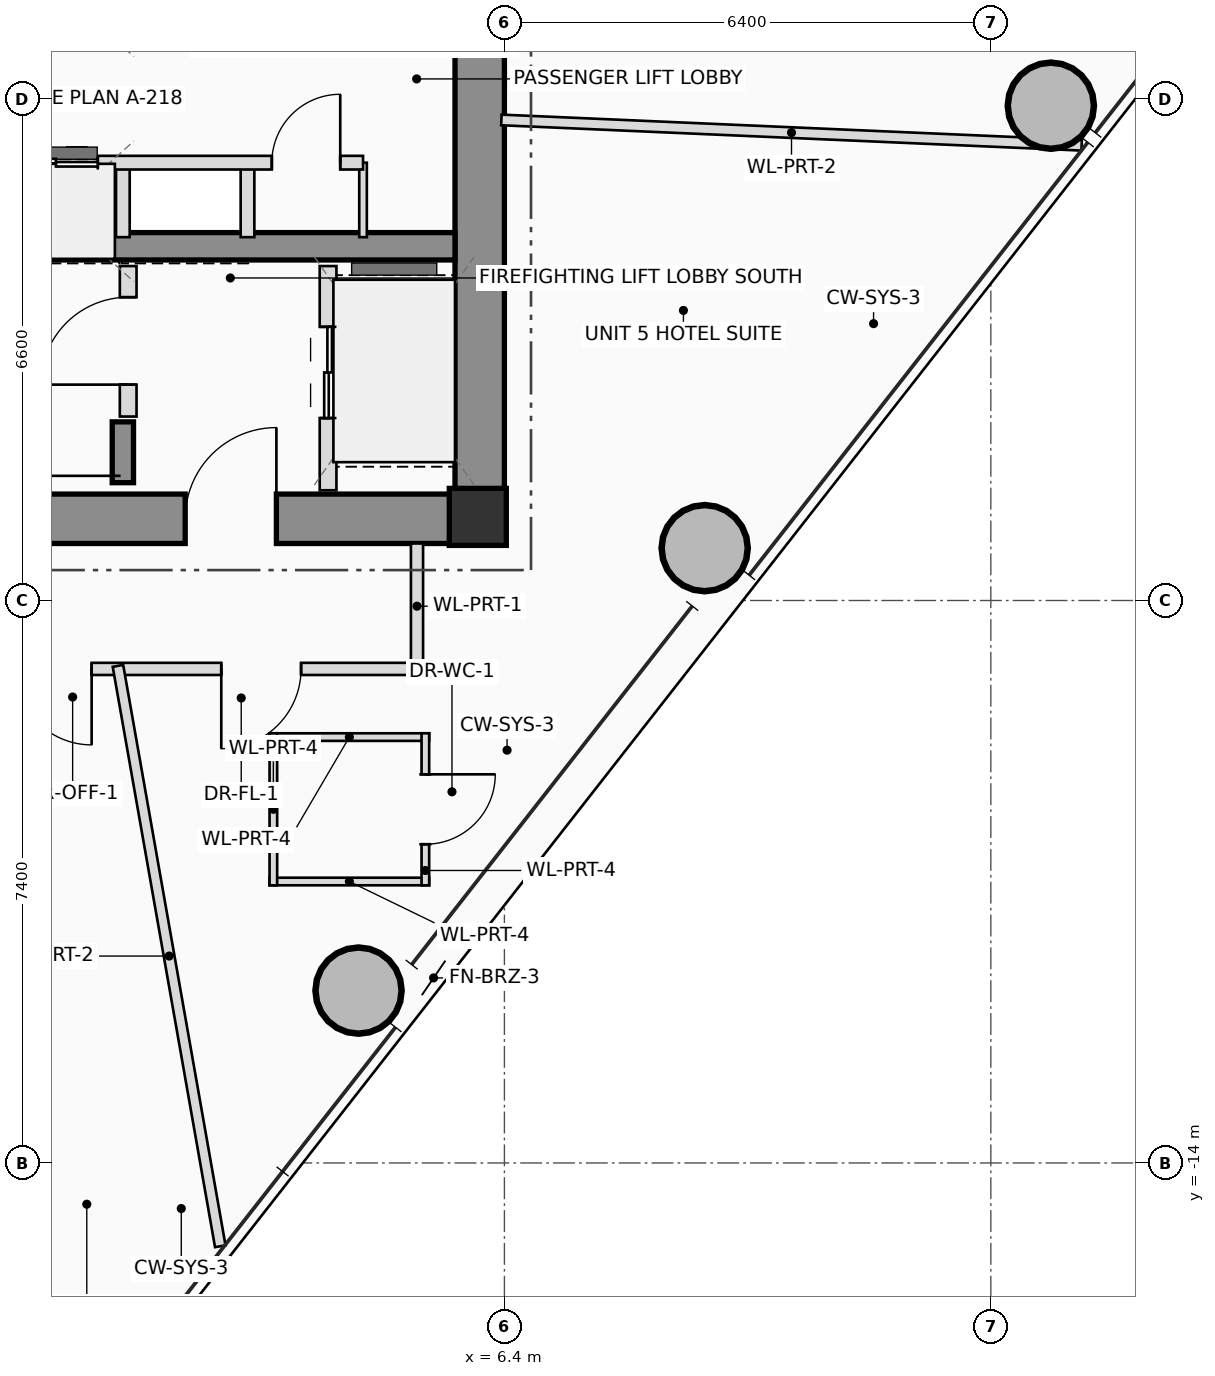
"""IFC4 building model, lengths in metres.
Left out: names, types, materials, properties, quantities, classifications, styles, units other than length and angle.
Written with IfcOpenShell. Run it as: python <this file> out.ifc"""

import sys

from ifc_helpers import new_model, si_unit, direction, frame, frame_2d, origin, origin_2d, place, context, subcontext, project, spatial, rectangle, hollow_circle, extrude, source, transform, mapped, element, fill, save


model = new_model("IFC4")
c1 = context("Model", 3, precision=1e-05, world=origin(), true_north=direction((0.0, 1.0)))
c2 = subcontext(c1, "Body", "Model", "MODEL_VIEW")
j1 = project(units=[si_unit("LENGTHUNIT", "METRE"), si_unit("PLANEANGLEUNIT", "RADIAN")], contexts=[c1])
p1 = place(None, origin())
s1 = spatial("IfcSite", under=j1, at=p1, CompositionType="ELEMENT")
p2 = place(p1, origin())
s2 = spatial("IfcBuilding", under=s1, at=p2, CompositionType="ELEMENT")
p3 = place(p2, frame((0.0, 0.0, 191.45)))
s3 = spatial("IfcBuildingStorey", under=s2, at=p3, CompositionType="ELEMENT", Elevation=191.45)
m1 = source(origin(), c2, "Body", "SweptSolid", [
    extrude(rectangle(XDim=0.75, YDim=0.75, at=origin_2d()), origin(), (0.0, 0.0, 1.0), 3.45),
])
p4 = place(p3, frame((6.05, -5.5, 0.0), z_axis=(0.0, 0.0, 1.0), x_axis=(1.0, 0.0, 0.0)))
e1 = element("IfcColumn", 1, at=p4, inside=s3, PredefinedType="COLUMN", context=c2, shape_type="MappedRepresentation", body=[
    mapped(m1, transform((0.0, 0.0, 0.0), scale=1.0)),
])
p5 = place(p3, frame((-6.4, -5.525, 0.0), z_axis=(0.0, 0.0, 1.0), x_axis=(1.0, 0.0, 0.0)))
e2 = element("IfcWall", 2, at=p5, inside=s3, PredefinedType="SHEAR", context=c2, shape_type="SweptSolid", body=[
    extrude(rectangle(XDim=12.8, YDim=0.65, at=frame_2d((6.4, 0.0))), origin(), (0.0, 0.0, 1.0), 3.45),
])
p6 = place(p5, frame((8.6, 0.0, 0.0)))
e3 = element("IfcOpeningElement", 3, at=p6, cuts=e2, PredefinedType="OPENING", context=c2, shape_type="SweptSolid", body=[
    extrude(rectangle(XDim=1.2, YDim=2.2, at=frame_2d((0.6, 1.1))), frame((0.0, 0.335, 0.0), z_axis=(0.0, -1.0, 0.0), x_axis=(1.0, 0.0, 0.0)), (0.0, 0.0, 1.0), 0.67),
])
p7 = place(p3, frame((6.075, -5.2, 0.0), z_axis=(0.0, 0.0, 1.0), x_axis=(0.0, 1.0, 0.0)))
e4 = element("IfcWall", 4, at=p7, inside=s3, PredefinedType="SHEAR", context=c2, shape_type="SweptSolid", body=[
    extrude(rectangle(XDim=10.4, YDim=0.65, at=frame_2d((5.2, 0.0))), origin(), (0.0, 0.0, 1.0), 3.45),
])
p8 = place(p3, frame((-5.75, -1.94, 0.0), z_axis=(0.0, 0.0, 1.0), x_axis=(1.0, 0.0, 0.0)))
e5 = element("IfcWall", 5, at=p8, inside=s3, PredefinedType="SHEAR", context=c2, shape_type="SweptSolid", body=[
    extrude(rectangle(XDim=11.5, YDim=0.36, at=frame_2d((5.75, 0.0))), origin(), (0.0, 0.0, 1.0), 3.45),
])
p9 = place(p3, frame((1.38, -5.05, 0.0), z_axis=(0.0, 0.0, 1.0), x_axis=(0.0, 1.0, 0.0)))
e6 = element("IfcWall", 6, at=p9, inside=s3, PredefinedType="SHEAR", context=c2, shape_type="SweptSolid", body=[
    extrude(rectangle(XDim=0.8, YDim=0.28, at=frame_2d((0.4, 0.0))), origin(), (0.0, 0.0, 1.0), 3.45),
])
m2 = source(origin(), c2, "Body", "SweptSolid", [
    extrude(hollow_circle(Radius=0.575, WallThickness=0.042, at=origin_2d()), origin(), (0.0, 0.0, 1.0), 3.45),
])
for number, where, z_axis, x_axis in (
    (7, (4.481, -11.732, 0.0), (0.0, 0.0, 1.0), (1.0, 0.0, 0.0)),
    (8, (9.035, -5.911, 0.0), (0.0, 0.0, 1.0), (1.0, 0.0, 0.0)),
    (9, (13.59, -0.09, 0.0), (0.0, 0.0, 1.0), (1.0, 0.0, 0.0)),
):
    element("IfcColumn", number, at=place(p3, frame(where, z_axis=z_axis, x_axis=x_axis)), inside=s3, PredefinedType="COLUMN", context=c2, shape_type="MappedRepresentation", body=[
        mapped(m2, transform((0.0, 0.0, 0.0), scale=1.0)),
    ])
p10 = place(p3, frame((1.45, -4.18, 0.0), z_axis=(0.0, 0.0, 1.0), x_axis=(0.0, 1.0, 0.0)))
e10 = element("IfcWall", 10, at=p10, inside=s3, PredefinedType="PLUMBINGWALL", context=c2, shape_type="SweptSolid", body=[
    extrude(rectangle(XDim=1.98, YDim=0.22, at=frame_2d((0.99, 0.0))), origin(), (0.0, 0.0, 1.0), 3.25),
])
p11 = place(p10, frame((0.42, 0.0, 0.0)))
e11 = element("IfcOpeningElement", 11, at=p11, cuts=e10, PredefinedType="OPENING", context=c2, shape_type="SweptSolid", body=[
    extrude(rectangle(XDim=1.15, YDim=2.15, at=frame_2d((0.575, 1.075))), frame((0.0, 0.12, 0.0), z_axis=(0.0, -1.0, 0.0), x_axis=(1.0, 0.0, 0.0)), (0.0, 0.0, 1.0), 0.24),
])
p12 = place(p3, frame((4.08, -5.15, 0.0), z_axis=(0.0, 0.0, 1.0), x_axis=(0.0, 1.0, 0.0)))
e12 = element("IfcWall", 12, at=p12, inside=s3, PredefinedType="PLUMBINGWALL", context=c2, shape_type="SweptSolid", body=[
    extrude(rectangle(XDim=2.95, YDim=0.22, at=frame_2d((1.475, 0.0))), origin(), (0.0, 0.0, 1.0), 3.25),
])
p13 = place(p12, frame((0.95, 0.0, 0.0)))
e13 = element("IfcOpeningElement", 13, at=p13, cuts=e12, PredefinedType="OPENING", context=c2, shape_type="SweptSolid", body=[
    extrude(rectangle(XDim=1.2, YDim=2.25, at=frame_2d((0.6, 1.125))), frame((0.0, 0.12, 0.0), z_axis=(0.0, -1.0, 0.0), x_axis=(1.0, 0.0, 0.0)), (0.0, 0.0, 1.0), 0.24),
])
for number, where, z_axis, x_axis in (
    (14, (1.38, -1.82, 0.0), (0.0, 0.0, 1.0), (0.0, 1.0, 0.0)),
    (15, (3.02, -1.82, 0.0), (0.0, 0.0, 1.0), (0.0, 1.0, 0.0)),
):
    element("IfcWall", number, at=place(p3, frame(where, z_axis=z_axis, x_axis=x_axis)), inside=s3, PredefinedType="PLUMBINGWALL", context=c2, shape_type="SweptSolid", body=[
        extrude(rectangle(XDim=0.98, YDim=0.18, at=frame_2d((0.49, 0.0))), origin(), (0.0, 0.0, 1.0), 3.25),
    ])
p14 = place(p3, frame((4.54, -1.82, 0.0), z_axis=(0.0, 0.0, 1.0), x_axis=(0.0, 1.0, 0.0)))
e16 = element("IfcWall", 16, at=p14, inside=s3, PredefinedType="PARTITIONING", context=c2, shape_type="SweptSolid", body=[
    extrude(rectangle(XDim=0.98, YDim=0.1, at=frame_2d((0.49, 0.0))), origin(), (0.0, 0.0, 1.0), 3.25),
])
p15 = place(p3, frame((-5.68, -0.84, 0.0), z_axis=(0.0, 0.0, 1.0), x_axis=(1.0, 0.0, 0.0)))
e17 = element("IfcWall", 17, at=p15, inside=s3, PredefinedType="PLUMBINGWALL", context=c2, shape_type="SweptSolid", body=[
    extrude(rectangle(XDim=10.22, YDim=0.18, at=frame_2d((5.11, 0.0))), origin(), (0.0, 0.0, 1.0), 3.25),
])
p16 = place(p15, frame((1.38, 0.0, 0.0)))
e18 = element("IfcOpeningElement", 18, at=p16, cuts=e17, PredefinedType="OPENING", context=c2, shape_type="SweptSolid", body=[
    extrude(rectangle(XDim=0.9, YDim=2.05, at=frame_2d((0.45, 1.025))), frame((0.0, 0.1, 0.0), z_axis=(0.0, -1.0, 0.0), x_axis=(1.0, 0.0, 0.0)), (0.0, 0.0, 1.0), 0.2),
])
p17 = place(p15, frame((3.93, 0.0, 0.0)))
e19 = element("IfcOpeningElement", 19, at=p17, cuts=e17, PredefinedType="OPENING", context=c2, shape_type="SweptSolid", body=[
    extrude(rectangle(XDim=1.1, YDim=2.2, at=frame_2d((0.55, 1.1))), frame((0.0, 0.1, 0.0), z_axis=(0.0, -1.0, 0.0), x_axis=(1.0, 0.0, 0.0)), (0.0, 0.0, 1.0), 0.2),
])
p18 = place(p15, frame((5.63, 0.0, 0.0)))
e20 = element("IfcOpeningElement", 20, at=p18, cuts=e17, PredefinedType="OPENING", context=c2, shape_type="SweptSolid", body=[
    extrude(rectangle(XDim=1.1, YDim=2.2, at=frame_2d((0.55, 1.1))), frame((0.0, 0.1, 0.0), z_axis=(0.0, -1.0, 0.0), x_axis=(1.0, 0.0, 0.0)), (0.0, 0.0, 1.0), 0.2),
])
p19 = place(p15, frame((9.02, 0.0, 0.0)))
e21 = element("IfcOpeningElement", 21, at=p19, cuts=e17, PredefinedType="OPENING", context=c2, shape_type="SweptSolid", body=[
    extrude(rectangle(XDim=0.9, YDim=2.05, at=frame_2d((0.45, 1.025))), frame((0.0, 0.1, 0.0), z_axis=(0.0, -1.0, 0.0), x_axis=(1.0, 0.0, 0.0)), (0.0, 0.0, 1.0), 0.2),
])
for number, where, z_axis, x_axis in (
    (22, (3.31, -8.397, 0.0), (0.0, 0.0, 1.0), (1.0, 0.0, 0.0)),
    (23, (5.41, -10.297, 0.0), (0.0, 0.0, 1.0), (-1.0, 0.0, 0.0)),
):
    element("IfcWall", number, at=place(p3, frame(where, z_axis=z_axis, x_axis=x_axis)), inside=s3, PredefinedType="PARTITIONING", context=c2, shape_type="SweptSolid", body=[
        extrude(rectangle(XDim=2.1, YDim=0.1, at=frame_2d((1.05, 0.0))), origin(), (0.0, 0.0, 1.0), 2.605),
    ])
p20 = place(p3, frame((5.36, -8.347, 0.0), z_axis=(0.0, 0.0, 1.0), x_axis=(0.0, -1.0, 0.0)))
e24 = element("IfcWall", 24, at=p20, inside=s3, PredefinedType="PARTITIONING", context=c2, shape_type="SweptSolid", body=[
    extrude(rectangle(XDim=2.0, YDim=0.1, at=frame_2d((1.0, 0.0))), origin(), (0.0, 0.0, 1.0), 2.605),
])
p21 = place(p20, frame((0.54, 0.0, 0.0)))
e25 = element("IfcOpeningElement", 25, at=p21, cuts=e24, PredefinedType="OPENING", context=c2, shape_type="SweptSolid", body=[
    extrude(rectangle(XDim=0.92, YDim=2.1, at=frame_2d((0.46, 1.05))), frame((0.0, 0.06, 0.0), z_axis=(0.0, -1.0, 0.0), x_axis=(1.0, 0.0, 0.0)), (0.0, 0.0, 1.0), 0.12),
])
p22 = place(p3, frame((3.36, -10.347, 0.0), z_axis=(0.0, 0.0, 1.0), x_axis=(0.0, 1.0, 0.0)))
e26 = element("IfcWall", 26, at=p22, inside=s3, PredefinedType="PARTITIONING", context=c2, shape_type="SweptSolid", body=[
    extrude(rectangle(XDim=2.0, YDim=0.1, at=frame_2d((1.0, 0.0))), origin(), (0.0, 0.0, 1.0), 2.805),
])
p23 = place(p3, frame((5.25, -5.85, 0.0), z_axis=(0.0, 0.0, 1.0), x_axis=(0.0, -1.0, 0.0)))
e27 = element("IfcWall", 27, at=p23, inside=s3, PredefinedType="PARTITIONING", context=c2, shape_type="SweptSolid", body=[
    extrude(rectangle(XDim=1.65, YDim=0.16, at=frame_2d((0.825, 0.0))), origin(), (0.0, 0.0, 1.0), 3.25),
])
p24 = place(p3, frame((5.25, -7.5, 0.0), z_axis=(0.0, 0.0, 1.0), x_axis=(-1.0, 0.0, 0.0)))
e28 = element("IfcWall", 28, at=p24, inside=s3, PredefinedType="PARTITIONING", context=c2, shape_type="SweptSolid", body=[
    extrude(rectangle(XDim=11.61, YDim=0.16, at=frame_2d((5.805, 0.0))), origin(), (0.0, 0.0, 1.0), 2.605),
])
p25 = place(p24, frame((1.525, 0.0, 0.0)))
e29 = element("IfcOpeningElement", 29, at=p25, cuts=e28, PredefinedType="OPENING", context=c2, shape_type="SweptSolid", body=[
    extrude(rectangle(XDim=1.05, YDim=2.2, at=frame_2d((0.525, 1.1))), frame((0.0, 0.09, 0.0), z_axis=(0.0, -1.0, 0.0), x_axis=(1.0, 0.0, 0.0)), (0.0, 0.0, 1.0), 0.18),
])
p26 = place(p24, frame((4.281, 0.0, 0.0)))
e30 = element("IfcOpeningElement", 30, at=p26, cuts=e28, PredefinedType="OPENING", context=c2, shape_type="SweptSolid", body=[
    extrude(rectangle(XDim=1.0, YDim=2.25, at=frame_2d((0.5, 1.125))), frame((0.0, 0.09, 0.0), z_axis=(0.0, -1.0, 0.0), x_axis=(1.0, 0.0, 0.0)), (0.0, 0.0, 1.0), 0.18),
])
p27 = place(p24, frame((7.409, 0.0, 0.0)))
e31 = element("IfcOpeningElement", 31, at=p27, cuts=e28, PredefinedType="OPENING", context=c2, shape_type="SweptSolid", body=[
    extrude(rectangle(XDim=1.0, YDim=2.25, at=frame_2d((0.5, 1.125))), frame((0.0, 0.09, 0.0), z_axis=(0.0, -1.0, 0.0), x_axis=(1.0, 0.0, 0.0)), (0.0, 0.0, 1.0), 0.18),
])
p28 = place(p3, frame((6.36, -0.278, 0.0), z_axis=(0.0, 0.0, 1.0), x_axis=(0.999047276506, -0.04364102778, 0.0)))
e32 = element("IfcWall", 32, at=p28, inside=s3, PredefinedType="PARTITIONING", context=c2, shape_type="SweptSolid", body=[
    extrude(rectangle(XDim=7.642, YDim=0.14, at=frame_2d((3.821, 0.0))), origin(), (0.0, 0.0, 1.0), 2.605),
])
p29 = place(p3, frame((1.315, -7.46, 0.0), z_axis=(0.0, 0.0, 1.0), x_axis=(0.173654204409, -0.984806690316, 0.0)))
e33 = element("IfcWall", 33, at=p29, inside=s3, PredefinedType="PARTITIONING", context=c2, shape_type="SweptSolid", body=[
    extrude(rectangle(XDim=7.754, YDim=0.14, at=frame_2d((3.877, 0.0))), origin(), (0.0, 0.0, 1.0), 2.765),
])
p30 = place(p6, origin())
e34 = element("IfcDoor", 34, at=p30, inside=s3, OperationType="SINGLE_SWING_RIGHT", PredefinedType="DOOR", context=c2, shape_type="SweptSolid", body=[
    extrude(rectangle(XDim=1.2, YDim=2.2, at=frame_2d((0.6, 1.1))), frame((0.0, 0.025, 0.0), z_axis=(0.0, -1.0, 0.0), x_axis=(1.0, 0.0, 0.0)), (0.0, 0.0, 1.0), 0.05),
])
fill(e3, e34)
p31 = place(p11, origin())
e35 = element("IfcDoor", 35, at=p31, inside=s3, OperationType="SINGLE_SWING_LEFT", PredefinedType="DOOR", context=c2, shape_type="SweptSolid", body=[
    extrude(rectangle(XDim=1.15, YDim=2.15, at=frame_2d((0.575, 1.075))), frame((0.0, 0.025, 0.0), z_axis=(0.0, -1.0, 0.0), x_axis=(1.0, 0.0, 0.0)), (0.0, 0.0, 1.0), 0.05),
])
fill(e11, e35)
p32 = place(p13, origin())
e36 = element("IfcDoor", 36, at=p32, inside=s3, OperationType="DOUBLE_DOOR_SLIDING", PredefinedType="DOOR", context=c2, shape_type="SweptSolid", body=[
    extrude(rectangle(XDim=1.2, YDim=2.25, at=frame_2d((0.6, 1.125))), frame((0.0, 0.025, 0.0), z_axis=(0.0, -1.0, 0.0), x_axis=(1.0, 0.0, 0.0)), (0.0, 0.0, 1.0), 0.05),
])
fill(e13, e36)
p33 = place(p18, origin())
e37 = element("IfcDoor", 37, at=p33, inside=s3, OperationType="DOUBLE_DOOR_SLIDING", PredefinedType="DOOR", context=c2, shape_type="SweptSolid", body=[
    extrude(rectangle(XDim=1.1, YDim=2.2, at=frame_2d((0.55, 1.1))), frame((0.0, 0.025, 0.0), z_axis=(0.0, -1.0, 0.0), x_axis=(1.0, 0.0, 0.0)), (0.0, 0.0, 1.0), 0.05),
])
fill(e20, e37)
p34 = place(p19, origin())
e38 = element("IfcDoor", 38, at=p34, inside=s3, OperationType="SINGLE_SWING_RIGHT", PredefinedType="DOOR", context=c2, shape_type="SweptSolid", body=[
    extrude(rectangle(XDim=0.9, YDim=2.05, at=frame_2d((0.45, 1.025))), frame((0.0, 0.025, 0.0), z_axis=(0.0, -1.0, 0.0), x_axis=(1.0, 0.0, 0.0)), (0.0, 0.0, 1.0), 0.05),
])
fill(e21, e38)
p35 = place(p21, origin())
e39 = element("IfcDoor", 39, at=p35, inside=s3, OperationType="SINGLE_SWING_LEFT", PredefinedType="DOOR", context=c2, shape_type="SweptSolid", body=[
    extrude(rectangle(XDim=0.92, YDim=2.1, at=frame_2d((0.46, 1.05))), frame((0.0, 0.025, 0.0), z_axis=(0.0, -1.0, 0.0), x_axis=(1.0, 0.0, 0.0)), (0.0, 0.0, 1.0), 0.05),
])
fill(e25, e39)
p36 = place(p25, origin())
e40 = element("IfcDoor", 40, at=p36, inside=s3, OperationType="SINGLE_SWING_RIGHT", PredefinedType="DOOR", context=c2, shape_type="SweptSolid", body=[
    extrude(rectangle(XDim=1.05, YDim=2.2, at=frame_2d((0.525, 1.1))), frame((0.0, 0.025, 0.0), z_axis=(0.0, -1.0, 0.0), x_axis=(1.0, 0.0, 0.0)), (0.0, 0.0, 1.0), 0.05),
])
fill(e29, e40)
p37 = place(p26, origin())
e41 = element("IfcDoor", 41, at=p37, inside=s3, OperationType="SINGLE_SWING_LEFT", PredefinedType="DOOR", context=c2, shape_type="SweptSolid", body=[
    extrude(rectangle(XDim=1.0, YDim=2.25, at=frame_2d((0.5, 1.125))), frame((0.0, 0.025, 0.0), z_axis=(0.0, -1.0, 0.0), x_axis=(1.0, 0.0, 0.0)), (0.0, 0.0, 1.0), 0.05),
])
fill(e30, e41)
save(model, sys.argv[1])
